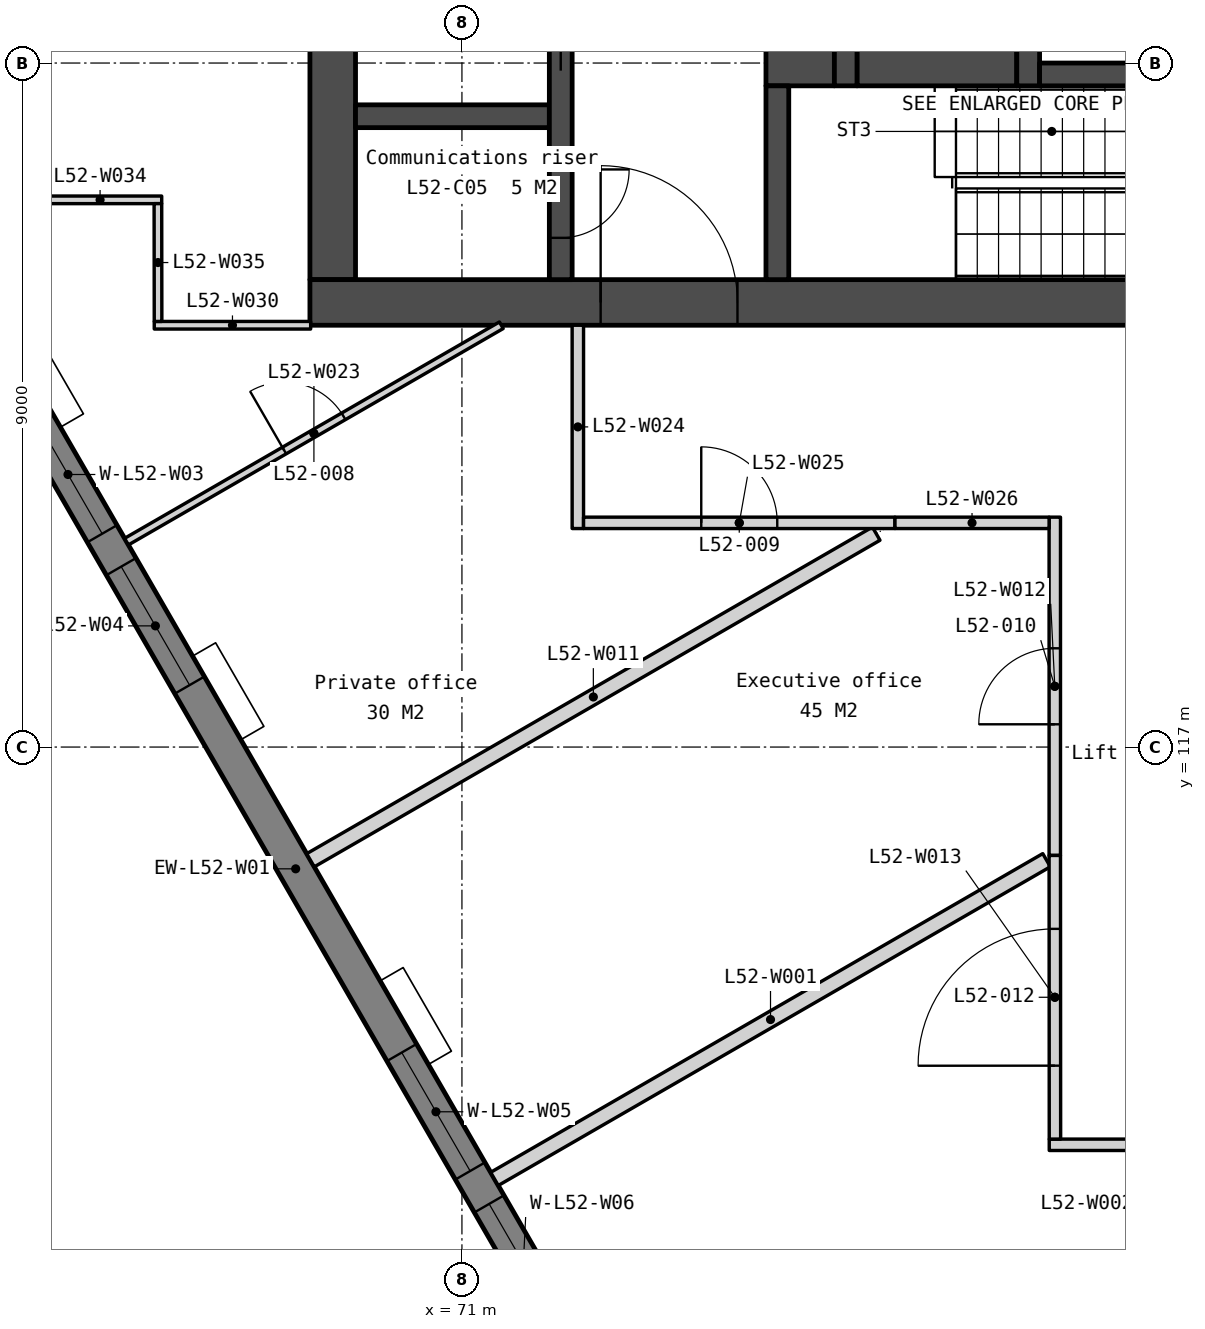
"""IFC4 building model, lengths in metres.
Left out: names, types, materials, properties, quantities, classifications, styles, units other than length and angle.
Written with IfcOpenShell. Run it as: python <this file> out.ifc"""

import sys

from ifc_helpers import new_model, si_unit, direction, frame, frame_2d, origin, place, context, subcontext, project, spatial, polyline, rectangle, outline, extrude, element, fill, save


model = new_model("IFC4")
c1 = context("Model", 3, precision=1e-05, world=origin(), true_north=direction((0.0, 1.0)))
c2 = subcontext(c1, "Body", "Model", "MODEL_VIEW")
j1 = project(units=[si_unit("LENGTHUNIT", "METRE"), si_unit("PLANEANGLEUNIT", "RADIAN")], contexts=[c1])
p1 = place(None, origin())
s1 = spatial("IfcSite", under=j1, at=p1, CompositionType="ELEMENT")
p2 = place(p1, origin())
s2 = spatial("IfcBuilding", under=s1, at=p2, CompositionType="ELEMENT")
p3 = place(p2, frame((0.0, 0.0, 207.5)))
s3 = spatial("IfcBuildingStorey", under=s2, at=p3, CompositionType="ELEMENT", Elevation=207.5)
p4 = place(p3, frame((69.3, 133.95, 0.0), z_axis=(0.0, 0.0, 1.0), x_axis=(0.0, -1.0, 0.0)))
e1 = element("IfcWall", 1, at=p4, inside=s3, PredefinedType="SOLIDWALL", context=c2, shape_type="SweptSolid", body=[
    extrude(rectangle(XDim=10.8, YDim=0.6, at=frame_2d((5.4, 0.0))), origin(), (0.0, 0.0, 1.0), 3.75),
])
p5 = place(p3, frame((69.0, 122.85, 0.0), z_axis=(0.0, 0.0, 1.0), x_axis=(1.0, 0.0, 0.0)))
e2 = element("IfcWall", 2, at=p5, inside=s3, PredefinedType="SOLIDWALL", context=c2, shape_type="SweptSolid", body=[
    extrude(rectangle(XDim=22.0, YDim=0.6, at=frame_2d((11.0, 0.0))), origin(), (0.0, 0.0, 1.0), 3.75),
])
p6 = place(p5, frame((16.375, 0.0, 0.0)))
e3 = element("IfcOpeningElement", 3, at=p6, cuts=e2, PredefinedType="OPENING", context=c2, shape_type="SweptSolid", body=[
    extrude(rectangle(XDim=1.8, YDim=2.1, at=frame_2d((0.9, 1.05))), frame((0.0, 0.31, 0.0), z_axis=(0.0, -1.0, 0.0), x_axis=(1.0, 0.0, 0.0)), (0.0, 0.0, 1.0), 0.62),
])
p7 = place(p5, frame((3.825, 0.0, 0.0)))
e4 = element("IfcOpeningElement", 4, at=p7, cuts=e2, PredefinedType="OPENING", context=c2, shape_type="SweptSolid", body=[
    extrude(rectangle(XDim=1.8, YDim=2.1, at=frame_2d((0.9, 1.05))), frame((0.0, 0.31, 0.0), z_axis=(0.0, -1.0, 0.0), x_axis=(1.0, 0.0, 0.0)), (0.0, 0.0, 1.0), 0.62),
])
p8 = place(p5, frame((12.85, 0.0, 0.0)))
e5 = element("IfcOpeningElement", 5, at=p8, cuts=e2, PredefinedType="OPENING", context=c2, shape_type="SweptSolid", body=[
    extrude(rectangle(XDim=1.5, YDim=2.1, at=frame_2d((0.75, 1.05))), frame((0.0, 0.31, 0.0), z_axis=(0.0, -1.0, 0.0), x_axis=(1.0, 0.0, 0.0)), (0.0, 0.0, 1.0), 0.62),
])
p9 = place(p3, frame((69.6, 125.3, 0.0), z_axis=(0.0, 0.0, 1.0), x_axis=(1.0, 0.0, 0.0)))
e6 = element("IfcWall", 6, at=p9, inside=s3, PredefinedType="SOLIDWALL", context=c2, shape_type="SweptSolid", body=[
    extrude(rectangle(XDim=2.55, YDim=0.3, at=frame_2d((1.275, 0.0))), origin(), (0.0, 0.0, 1.0), 3.75),
])
p10 = place(p3, frame((72.3, 133.95, 0.0), z_axis=(0.0, 0.0, 1.0), x_axis=(0.0, -1.0, 0.0)))
e7 = element("IfcWall", 7, at=p10, inside=s3, PredefinedType="SOLIDWALL", context=c2, shape_type="SweptSolid", body=[
    extrude(rectangle(XDim=10.8, YDim=0.3, at=frame_2d((5.4, 0.0))), origin(), (0.0, 0.0, 1.0), 3.75),
])
p11 = place(p10, frame((6.95, 0.0, 0.0)))
e8 = element("IfcOpeningElement", 8, at=p11, cuts=e7, PredefinedType="OPENING", context=c2, shape_type="SweptSolid", body=[
    extrude(rectangle(XDim=1.1, YDim=2.1, at=frame_2d((0.55, 1.05))), frame((0.0, 0.16, 0.0), z_axis=(0.0, -1.0, 0.0), x_axis=(1.0, 0.0, 0.0)), (0.0, 0.0, 1.0), 0.32),
])
p12 = place(p10, frame((9.35, 0.0, 0.0)))
e9 = element("IfcOpeningElement", 9, at=p12, cuts=e7, PredefinedType="OPENING", context=c2, shape_type="SweptSolid", body=[
    extrude(rectangle(XDim=0.9, YDim=2.1, at=frame_2d((0.45, 1.05))), frame((0.0, 0.16, 0.0), z_axis=(0.0, -1.0, 0.0), x_axis=(1.0, 0.0, 0.0)), (0.0, 0.0, 1.0), 0.32),
])
p13 = place(p10, frame((5.1, 0.0, 0.0)))
e10 = element("IfcOpeningElement", 10, at=p13, cuts=e7, PredefinedType="OPENING", context=c2, shape_type="SweptSolid", body=[
    extrude(rectangle(XDim=1.0, YDim=2.1, at=frame_2d((0.5, 1.05))), frame((0.0, 0.16, 0.0), z_axis=(0.0, -1.0, 0.0), x_axis=(1.0, 0.0, 0.0)), (0.0, 0.0, 1.0), 0.32),
])
p14 = place(p3, frame((75.0, 126.075, 0.0), z_axis=(0.0, 0.0, 1.0), x_axis=(1.0, 0.0, 0.0)))
e11 = element("IfcWall", 11, at=p14, inside=s3, PredefinedType="SOLIDWALL", context=c2, shape_type="SweptSolid", body=[
    extrude(rectangle(XDim=0.9, YDim=0.75, at=frame_2d((0.45, 0.0))), origin(), (0.0, 0.0, 1.0), 3.75),
])
p15 = place(p3, frame((75.15, 125.7, 0.0), z_axis=(0.0, 0.0, 1.0), x_axis=(0.0, -1.0, 0.0)))
e12 = element("IfcWall", 12, at=p15, inside=s3, PredefinedType="SOLIDWALL", context=c2, shape_type="SweptSolid", body=[
    extrude(rectangle(XDim=2.55, YDim=0.3, at=frame_2d((1.275, 0.0))), origin(), (0.0, 0.0, 1.0), 3.75),
])
p16 = place(p3, frame((76.05, 133.95, 0.0), z_axis=(0.0, 0.0, 1.0), x_axis=(0.0, -1.0, 0.0)))
e13 = element("IfcWall", 13, at=p16, inside=s3, PredefinedType="SOLIDWALL", context=c2, shape_type="SweptSolid", body=[
    extrude(rectangle(XDim=8.25, YDim=0.3, at=frame_2d((4.125, 0.0))), origin(), (0.0, 0.0, 1.0), 3.75),
])
p17 = place(p3, frame((76.2, 126.075, 0.0), z_axis=(0.0, 0.0, 1.0), x_axis=(1.0, 0.0, 0.0)))
e14 = element("IfcWall", 14, at=p17, inside=s3, PredefinedType="SOLIDWALL", context=c2, shape_type="SweptSolid", body=[
    extrude(rectangle(XDim=2.1, YDim=0.75, at=frame_2d((1.05, 0.0))), origin(), (0.0, 0.0, 1.0), 3.75),
])
p18 = place(p3, frame((78.45, 133.95, 0.0), z_axis=(0.0, 0.0, 1.0), x_axis=(0.0, -1.0, 0.0)))
e15 = element("IfcWall", 15, at=p18, inside=s3, PredefinedType="SOLIDWALL", context=c2, shape_type="SweptSolid", body=[
    extrude(rectangle(XDim=8.25, YDim=0.3, at=frame_2d((4.125, 0.0))), origin(), (0.0, 0.0, 1.0), 3.75),
])
p19 = place(p18, frame((0.6, 0.0, 0.0)))
e16 = element("IfcOpeningElement", 16, at=p19, cuts=e15, PredefinedType="OPENING", context=c2, shape_type="SweptSolid", body=[
    extrude(rectangle(XDim=1.1, YDim=2.1, at=frame_2d((0.55, 1.05))), frame((0.0, 0.16, 0.0), z_axis=(0.0, -1.0, 0.0), x_axis=(1.0, 0.0, 0.0)), (0.0, 0.0, 1.0), 0.32),
])
p20 = place(p18, frame((3.2, 0.0, 0.0)))
e17 = element("IfcOpeningElement", 17, at=p20, cuts=e15, PredefinedType="OPENING", context=c2, shape_type="SweptSolid", body=[
    extrude(rectangle(XDim=1.1, YDim=2.1, at=frame_2d((0.55, 1.05))), frame((0.0, 0.16, 0.0), z_axis=(0.0, -1.0, 0.0), x_axis=(1.0, 0.0, 0.0)), (0.0, 0.0, 1.0), 0.32),
])
p21 = place(p18, frame((5.8, 0.0, 0.0)))
e18 = element("IfcOpeningElement", 18, at=p21, cuts=e15, PredefinedType="OPENING", context=c2, shape_type="SweptSolid", body=[
    extrude(rectangle(XDim=1.1, YDim=2.1, at=frame_2d((0.55, 1.05))), frame((0.0, 0.16, 0.0), z_axis=(0.0, -1.0, 0.0), x_axis=(1.0, 0.0, 0.0)), (0.0, 0.0, 1.0), 0.32),
])
p22 = place(p3, frame((78.6, 125.85, 0.0), z_axis=(0.0, 0.0, 1.0), x_axis=(1.0, 0.0, 0.0)))
e19 = element("IfcWall", 19, at=p22, inside=s3, PredefinedType="SOLIDWALL", context=c2, shape_type="SweptSolid", body=[
    extrude(rectangle(XDim=3.2, YDim=0.3, at=frame_2d((1.6, 0.0))), origin(), (0.0, 0.0, 1.0), 3.75),
])
p23 = place(p3, frame((59.13, 132.168, -0.15), z_axis=(0.0, 0.0, 1.0), x_axis=(0.500002199942, -0.866024133644, 0.0)))
e20 = element("IfcWall", 20, at=p23, inside=s3, PredefinedType="SOLIDWALL", context=c2, shape_type="SweptSolid", body=[
    extrude(outline(polyline([(38.729, 0.0), (38.729, 3.9), (0.0, 3.9), (0.0, 0.0), (38.729, 0.0)])), frame((0.0, 0.225, 0.0), z_axis=(0.0, -1.0, 0.0), x_axis=(1.0, 0.0, 0.0)), (0.0, 0.0, 1.0), 0.45),
])
p24 = place(p23, frame((2.791, 0.0, 0.95)))
e21 = element("IfcOpeningElement", 21, at=p24, cuts=e20, PredefinedType="OPENING", context=c2, shape_type="SweptSolid", body=[
    extrude(rectangle(XDim=1.8, YDim=2.2, at=frame_2d((0.9, 1.1))), frame((0.0, 0.235, 0.0), z_axis=(0.0, -1.0, 0.0), x_axis=(1.0, 0.0, 0.0)), (0.0, 0.0, 1.0), 0.47),
])
p25 = place(p23, frame((5.091, 0.0, 0.95)))
e22 = element("IfcOpeningElement", 22, at=p25, cuts=e20, PredefinedType="OPENING", context=c2, shape_type="SweptSolid", body=[
    extrude(rectangle(XDim=1.8, YDim=2.2, at=frame_2d((0.9, 1.1))), frame((0.0, 0.235, 0.0), z_axis=(0.0, -1.0, 0.0), x_axis=(1.0, 0.0, 0.0)), (0.0, 0.0, 1.0), 0.47),
])
p26 = place(p23, frame((12.473, 0.0, 0.95)))
e23 = element("IfcOpeningElement", 23, at=p26, cuts=e20, PredefinedType="OPENING", context=c2, shape_type="SweptSolid", body=[
    extrude(rectangle(XDim=1.8, YDim=2.2, at=frame_2d((0.9, 1.1))), frame((0.0, 0.235, 0.0), z_axis=(0.0, -1.0, 0.0), x_axis=(1.0, 0.0, 0.0)), (0.0, 0.0, 1.0), 0.47),
])
p27 = place(p23, frame((14.773, 0.0, 0.95)))
e24 = element("IfcOpeningElement", 24, at=p27, cuts=e20, PredefinedType="OPENING", context=c2, shape_type="SweptSolid", body=[
    extrude(rectangle(XDim=1.8, YDim=2.2, at=frame_2d((0.9, 1.1))), frame((0.0, 0.235, 0.0), z_axis=(0.0, -1.0, 0.0), x_axis=(1.0, 0.0, 0.0)), (0.0, 0.0, 1.0), 0.47),
])
p28 = place(p23, frame((22.156, 0.0, 0.95)))
e25 = element("IfcOpeningElement", 25, at=p28, cuts=e20, PredefinedType="OPENING", context=c2, shape_type="SweptSolid", body=[
    extrude(rectangle(XDim=1.8, YDim=2.2, at=frame_2d((0.9, 1.1))), frame((0.0, 0.235, 0.0), z_axis=(0.0, -1.0, 0.0), x_axis=(1.0, 0.0, 0.0)), (0.0, 0.0, 1.0), 0.47),
])
p29 = place(p23, frame((24.456, 0.0, 0.95)))
e26 = element("IfcOpeningElement", 26, at=p29, cuts=e20, PredefinedType="OPENING", context=c2, shape_type="SweptSolid", body=[
    extrude(rectangle(XDim=1.8, YDim=2.2, at=frame_2d((0.9, 1.1))), frame((0.0, 0.235, 0.0), z_axis=(0.0, -1.0, 0.0), x_axis=(1.0, 0.0, 0.0)), (0.0, 0.0, 1.0), 0.47),
])
p30 = place(p23, frame((31.838, 0.0, 0.95)))
e27 = element("IfcOpeningElement", 27, at=p30, cuts=e20, PredefinedType="OPENING", context=c2, shape_type="SweptSolid", body=[
    extrude(rectangle(XDim=1.8, YDim=2.2, at=frame_2d((0.9, 1.1))), frame((0.0, 0.235, 0.0), z_axis=(0.0, -1.0, 0.0), x_axis=(1.0, 0.0, 0.0)), (0.0, 0.0, 1.0), 0.47),
])
p31 = place(p23, frame((34.138, 0.0, 0.95)))
e28 = element("IfcOpeningElement", 28, at=p31, cuts=e20, PredefinedType="OPENING", context=c2, shape_type="SweptSolid", body=[
    extrude(rectangle(XDim=1.8, YDim=2.2, at=frame_2d((0.9, 1.1))), frame((0.0, 0.235, 0.0), z_axis=(0.0, -1.0, 0.0), x_axis=(1.0, 0.0, 0.0)), (0.0, 0.0, 1.0), 0.47),
])
p32 = place(p3, frame((71.428, 111.318, 0.0), z_axis=(0.0, 0.0, 1.0), x_axis=(0.866016898545, 0.500014731218, 0.0)))
e29 = element("IfcWall", 29, at=p32, inside=s3, PredefinedType="PARTITIONING", context=c2, shape_type="SweptSolid", body=[
    extrude(rectangle(XDim=8.387, YDim=0.2, at=frame_2d((4.194, 0.0))), origin(), (0.0, 0.0, 1.0), 3.75),
])
p33 = place(p3, frame((78.727, 111.767, 0.0), z_axis=(0.0, 0.0, 1.0), x_axis=(1.0, 0.0, 0.0)))
e30 = element("IfcWall", 30, at=p33, inside=s3, PredefinedType="PARTITIONING", context=c2, shape_type="SweptSolid", body=[
    extrude(rectangle(XDim=2.546, YDim=0.15, at=frame_2d((1.273, 0.0))), origin(), (0.0, 0.0, 1.0), 3.75),
])
p34 = place(p3, frame((69.007, 115.51, 0.0), z_axis=(0.0, 0.0, 1.0), x_axis=(0.866033739143, 0.499985562458, 0.0)))
e31 = element("IfcWall", 31, at=p34, inside=s3, PredefinedType="PARTITIONING", context=c2, shape_type="SweptSolid", body=[
    extrude(rectangle(XDim=8.594, YDim=0.2, at=frame_2d((4.297, 0.0))), origin(), (0.0, 0.0, 1.0), 3.75),
])
p35 = place(p3, frame((78.8, 115.574, 0.0), z_axis=(0.0, 0.0, 1.0), x_axis=(0.0, 1.0, 0.0)))
e32 = element("IfcWall", 32, at=p35, inside=s3, PredefinedType="PARTITIONING", context=c2, shape_type="SweptSolid", body=[
    extrude(rectangle(XDim=4.451, YDim=0.15, at=frame_2d((2.226, 0.0))), origin(), (0.0, 0.0, 1.0), 3.75),
])
p36 = place(p35, frame((1.726, 0.0, 0.0)))
e33 = element("IfcOpeningElement", 33, at=p36, cuts=e32, PredefinedType="OPENING", context=c2, shape_type="SweptSolid", body=[
    extrude(rectangle(XDim=1.0, YDim=2.1, at=frame_2d((0.5, 1.05))), frame((0.0, 0.085, 0.0), z_axis=(0.0, -1.0, 0.0), x_axis=(1.0, 0.0, 0.0)), (0.0, 0.0, 1.0), 0.17),
])
p37 = place(p3, frame((78.802, 111.842, 0.0), z_axis=(0.0, 0.0, 1.0), x_axis=(-0.000523320397, 0.999999863068, 0.0)))
e34 = element("IfcWall", 34, at=p37, inside=s3, PredefinedType="PARTITIONING", context=c2, shape_type="SweptSolid", body=[
    extrude(rectangle(XDim=3.732, YDim=0.15, at=frame_2d((1.866, 0.0))), origin(), (0.0, 0.0, 1.0), 3.75),
])
p38 = place(p37, frame((0.966, 0.0, 0.0)))
e35 = element("IfcOpeningElement", 35, at=p38, cuts=e34, PredefinedType="OPENING", context=c2, shape_type="SweptSolid", body=[
    extrude(rectangle(XDim=1.8, YDim=2.1, at=frame_2d((0.9, 1.05))), frame((0.0, 0.085, 0.0), z_axis=(0.0, -1.0, 0.0), x_axis=(1.0, 0.0, 0.0)), (0.0, 0.0, 1.0), 0.17),
])
p39 = place(p3, frame((66.587, 119.703, 0.0), z_axis=(0.0, 0.0, 1.0), x_axis=(0.866023511746, 0.500003277092, 0.0)))
e36 = element("IfcWall", 36, at=p39, inside=s3, PredefinedType="PARTITIONING", context=c2, shape_type="SweptSolid", body=[
    extrude(rectangle(XDim=5.694, YDim=0.1, at=frame_2d((2.847, 0.0))), origin(), (0.0, 0.0, 1.0), 3.75),
])
p40 = place(p39, frame((2.397, 0.0, 0.0)))
e37 = element("IfcOpeningElement", 37, at=p40, cuts=e36, PredefinedType="OPENING", context=c2, shape_type="SweptSolid", body=[
    extrude(rectangle(XDim=0.9, YDim=2.1, at=frame_2d((0.45, 1.05))), frame((0.0, 0.06, 0.0), z_axis=(0.0, -1.0, 0.0), x_axis=(1.0, 0.0, 0.0)), (0.0, 0.0, 1.0), 0.12),
])
p41 = place(p3, frame((72.525, 119.875, 0.0), z_axis=(0.0, 0.0, 1.0), x_axis=(0.0, 1.0, 0.0)))
e38 = element("IfcWall", 38, at=p41, inside=s3, PredefinedType="PARTITIONING", context=c2, shape_type="SweptSolid", body=[
    extrude(rectangle(XDim=2.675, YDim=0.15, at=frame_2d((1.337, 0.0))), origin(), (0.0, 0.0, 1.0), 3.75),
])
p42 = place(p3, frame((72.6, 119.95, 0.0), z_axis=(0.0, 0.0, 1.0), x_axis=(1.0, 0.0, 0.0)))
e39 = element("IfcWall", 39, at=p42, inside=s3, PredefinedType="PARTITIONING", context=c2, shape_type="SweptSolid", body=[
    extrude(rectangle(XDim=4.097, YDim=0.15, at=frame_2d((2.049, 0.0))), origin(), (0.0, 0.0, 1.0), 3.75),
])
p43 = place(p42, frame((1.549, 0.0, 0.0)))
e40 = element("IfcOpeningElement", 40, at=p43, cuts=e39, PredefinedType="OPENING", context=c2, shape_type="SweptSolid", body=[
    extrude(rectangle(XDim=1.0, YDim=2.1, at=frame_2d((0.5, 1.05))), frame((0.0, 0.085, 0.0), z_axis=(0.0, -1.0, 0.0), x_axis=(1.0, 0.0, 0.0)), (0.0, 0.0, 1.0), 0.17),
])
p44 = place(p3, frame((76.697, 119.95, 0.0), z_axis=(0.0, 0.0, 1.0), x_axis=(1.0, 0.0, 0.0)))
e41 = element("IfcWall", 41, at=p44, inside=s3, PredefinedType="PARTITIONING", context=c2, shape_type="SweptSolid", body=[
    extrude(rectangle(XDim=2.028, YDim=0.15, at=frame_2d((1.014, 0.0))), origin(), (0.0, 0.0, 1.0), 3.75),
])
p45 = place(p3, frame((66.952, 122.55, 0.0), z_axis=(0.0, 0.0, 1.0), x_axis=(1.0, 0.0, 0.0)))
e42 = element("IfcWall", 42, at=p45, inside=s3, PredefinedType="PARTITIONING", context=c2, shape_type="SweptSolid", body=[
    extrude(rectangle(XDim=2.058, YDim=0.1, at=frame_2d((1.029, 0.0))), origin(), (0.0, 0.0, 1.0), 3.75),
])
p46 = place(p3, frame((65.428, 124.2, 0.0), z_axis=(0.0, 0.0, 1.0), x_axis=(1.0, 0.0, 0.0)))
e43 = element("IfcWall", 43, at=p46, inside=s3, PredefinedType="PARTITIONING", context=c2, shape_type="SweptSolid", body=[
    extrude(rectangle(XDim=1.622, YDim=0.1, at=frame_2d((0.811, 0.0))), origin(), (0.0, 0.0, 1.0), 3.28),
])
p47 = place(p3, frame((67.002, 122.6, 0.0), z_axis=(0.0, 0.0, 1.0), x_axis=(-0.001260238445, 0.999999205899, 0.0)))
e44 = element("IfcWall", 44, at=p47, inside=s3, PredefinedType="PARTITIONING", context=c2, shape_type="SweptSolid", body=[
    extrude(rectangle(XDim=1.55, YDim=0.1, at=frame_2d((0.775, 0.0))), origin(), (0.0, 0.0, 1.0), 3.75),
])
p48 = place(p11, origin())
e45 = element("IfcDoor", 45, at=p48, inside=s3, OperationType="SLIDING_TO_LEFT", PredefinedType="DOOR", context=c2, shape_type="SweptSolid", body=[
    extrude(rectangle(XDim=1.1, YDim=2.1, at=frame_2d((0.55, 1.05))), frame((0.0, 0.025, 0.0), z_axis=(0.0, -1.0, 0.0), x_axis=(1.0, 0.0, 0.0)), (0.0, 0.0, 1.0), 0.05),
])
fill(e8, e45)
p49 = place(p7, origin())
e46 = element("IfcDoor", 46, at=p49, inside=s3, OperationType="DOUBLE_DOOR_DOUBLE_SWING", PredefinedType="DOOR", context=c2, shape_type="SweptSolid", body=[
    extrude(rectangle(XDim=1.8, YDim=2.1, at=frame_2d((0.9, 1.05))), frame((0.0, 0.025, 0.0), z_axis=(0.0, -1.0, 0.0), x_axis=(1.0, 0.0, 0.0)), (0.0, 0.0, 1.0), 0.05),
])
fill(e4, e46)
p50 = place(p12, origin())
e47 = element("IfcDoor", 47, at=p50, inside=s3, OperationType="SINGLE_SWING_LEFT", PredefinedType="DOOR", context=c2, shape_type="SweptSolid", body=[
    extrude(rectangle(XDim=0.9, YDim=2.1, at=frame_2d((0.45, 1.05))), frame((0.0, 0.025, 0.0), z_axis=(0.0, -1.0, 0.0), x_axis=(1.0, 0.0, 0.0)), (0.0, 0.0, 1.0), 0.05),
])
fill(e9, e47)
p51 = place(p26, origin())
e48 = element("IfcWindow", 48, at=p51, inside=s3, PartitioningType="SINGLE_PANEL", PredefinedType="WINDOW", context=c2, shape_type="SweptSolid", body=[
    extrude(rectangle(XDim=1.8, YDim=2.2, at=frame_2d((0.9, 1.1))), frame((0.0, 0.03, 0.0), z_axis=(0.0, -1.0, 0.0), x_axis=(1.0, 0.0, 0.0)), (0.0, 0.0, 1.0), 0.06),
])
fill(e23, e48)
p52 = place(p27, origin())
e49 = element("IfcWindow", 49, at=p52, inside=s3, PartitioningType="SINGLE_PANEL", PredefinedType="WINDOW", context=c2, shape_type="SweptSolid", body=[
    extrude(rectangle(XDim=1.8, YDim=2.2, at=frame_2d((0.9, 1.1))), frame((0.0, 0.03, 0.0), z_axis=(0.0, -1.0, 0.0), x_axis=(1.0, 0.0, 0.0)), (0.0, 0.0, 1.0), 0.06),
])
fill(e24, e49)
p53 = place(p28, origin())
e50 = element("IfcWindow", 50, at=p53, inside=s3, PartitioningType="SINGLE_PANEL", PredefinedType="WINDOW", context=c2, shape_type="SweptSolid", body=[
    extrude(rectangle(XDim=1.8, YDim=2.2, at=frame_2d((0.9, 1.1))), frame((0.0, 0.03, 0.0), z_axis=(0.0, -1.0, 0.0), x_axis=(1.0, 0.0, 0.0)), (0.0, 0.0, 1.0), 0.06),
])
fill(e25, e50)
p54 = place(p29, origin())
e51 = element("IfcWindow", 51, at=p54, inside=s3, PartitioningType="SINGLE_PANEL", PredefinedType="WINDOW", context=c2, shape_type="SweptSolid", body=[
    extrude(rectangle(XDim=1.8, YDim=2.2, at=frame_2d((0.9, 1.1))), frame((0.0, 0.03, 0.0), z_axis=(0.0, -1.0, 0.0), x_axis=(1.0, 0.0, 0.0)), (0.0, 0.0, 1.0), 0.06),
])
fill(e26, e51)
p55 = place(p40, origin())
e52 = element("IfcDoor", 52, at=p55, inside=s3, OperationType="SINGLE_SWING_LEFT", PredefinedType="DOOR", context=c2, shape_type="SweptSolid", body=[
    extrude(rectangle(XDim=0.9, YDim=2.1, at=frame_2d((0.45, 1.05))), frame((0.0, 0.025, 0.0), z_axis=(0.0, -1.0, 0.0), x_axis=(1.0, 0.0, 0.0)), (0.0, 0.0, 1.0), 0.05),
])
fill(e37, e52)
p56 = place(p43, origin())
e53 = element("IfcDoor", 53, at=p56, inside=s3, OperationType="SINGLE_SWING_LEFT", PredefinedType="DOOR", context=c2, shape_type="SweptSolid", body=[
    extrude(rectangle(XDim=1.0, YDim=2.1, at=frame_2d((0.5, 1.05))), frame((0.0, 0.025, 0.0), z_axis=(0.0, -1.0, 0.0), x_axis=(1.0, 0.0, 0.0)), (0.0, 0.0, 1.0), 0.05),
])
fill(e40, e53)
p57 = place(p36, origin())
e54 = element("IfcDoor", 54, at=p57, inside=s3, OperationType="SINGLE_SWING_LEFT", PredefinedType="DOOR", context=c2, shape_type="SweptSolid", body=[
    extrude(rectangle(XDim=1.0, YDim=2.1, at=frame_2d((0.5, 1.05))), frame((0.0, 0.025, 0.0), z_axis=(0.0, -1.0, 0.0), x_axis=(1.0, 0.0, 0.0)), (0.0, 0.0, 1.0), 0.05),
])
fill(e33, e54)
p58 = place(p38, origin())
e55 = element("IfcDoor", 55, at=p58, inside=s3, OperationType="SINGLE_SWING_LEFT", PredefinedType="DOOR", context=c2, shape_type="SweptSolid", body=[
    extrude(rectangle(XDim=1.8, YDim=2.1, at=frame_2d((0.9, 1.05))), frame((0.0, 0.025, 0.0), z_axis=(0.0, -1.0, 0.0), x_axis=(1.0, 0.0, 0.0)), (0.0, 0.0, 1.0), 0.05),
])
fill(e35, e55)
save(model, sys.argv[1])
